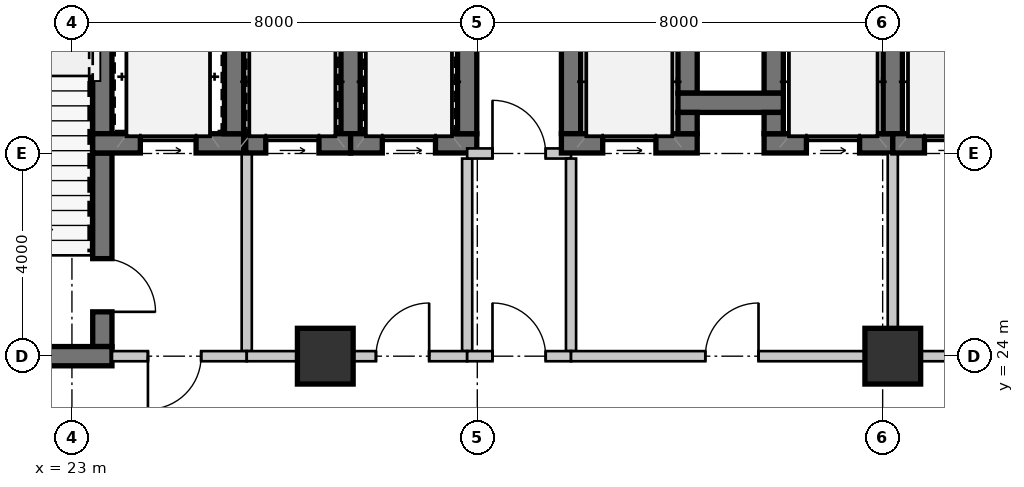
"""IFC4 building model, lengths in metres.
Left out: names, types, materials, properties, quantities, classifications, styles, units other than length and angle.
Written with IfcOpenShell. Run it as: python <this file> out.ifc"""

import sys

from ifc_helpers import new_model, si_unit, direction, frame, frame_2d, origin, origin_2d, place, context, subcontext, project, spatial, rectangle, extrude, source, transform, mapped, element, fill, save


model = new_model("IFC4")
c1 = context("Model", 3, precision=1e-05, world=origin(), true_north=direction((0.0, 1.0)))
c2 = subcontext(c1, "Body", "Model", "MODEL_VIEW")
j1 = project(units=[si_unit("LENGTHUNIT", "METRE"), si_unit("PLANEANGLEUNIT", "RADIAN")], contexts=[c1])
p1 = place(None, origin())
s1 = spatial("IfcSite", under=j1, at=p1, CompositionType="ELEMENT")
p2 = place(p1, origin())
s2 = spatial("IfcBuilding", under=s1, at=p2, CompositionType="ELEMENT")
p3 = place(p2, origin())
s3 = spatial("IfcBuildingStorey", under=s2, at=p3, CompositionType="ELEMENT", Elevation=0.0)
m1 = source(origin(), c2, "Body", "SweptSolid", [
    extrude(rectangle(XDim=1.1, YDim=1.1, at=origin_2d()), origin(), (0.0, 0.0, 1.0), 4.55),
])
for number, where, z_axis, x_axis in (
    (1, (28.0, 24.0, 0.0), (0.0, 0.0, 1.0), (1.0, 0.0, 0.0)),
    (2, (39.2, 24.0, 0.0), (0.0, 0.0, 1.0), (1.0, 0.0, 0.0)),
):
    element("IfcColumn", number, at=place(p3, frame(where, z_axis=z_axis, x_axis=x_axis)), inside=s3, PredefinedType="COLUMN", context=c2, shape_type="MappedRepresentation", body=[
        mapped(m1, transform((0.0, 0.0, 0.0), scale=1.0)),
    ])
m2 = source(origin(), c2, "Body", "SweptSolid", [
    extrude(rectangle(XDim=3.42, YDim=0.38, at=frame_2d((1.71, 0.0))), origin(), (0.0, 0.0, 1.0), 4.29),
])
p4 = place(p3, frame((23.6, 28.39, 0.0), z_axis=(0.0, 0.0, 1.0), x_axis=(0.0, 1.0, 0.0)))
e3 = element("IfcWall", 3, at=p4, inside=s3, PredefinedType="SHEAR", context=c2, shape_type="MappedRepresentation", body=[
    mapped(m2, transform((0.0, 0.0, 0.0), scale=1.0)),
])
m3 = source(origin(), c2, "Body", "SweptSolid", [
    extrude(rectangle(XDim=3.82, YDim=0.38, at=frame_2d((1.91, 0.0))), origin(), (0.0, 0.0, 1.0), 4.29),
])
p5 = place(p3, frame((23.6, 24.19, 0.0), z_axis=(0.0, 0.0, 1.0), x_axis=(0.0, 1.0, 0.0)))
e4 = element("IfcWall", 4, at=p5, inside=s3, PredefinedType="SHEAR", context=c2, shape_type="MappedRepresentation", body=[
    mapped(m3, transform((0.0, 0.0, 0.0), scale=1.0)),
])
m4 = source(origin(), c2, "Body", "SweptSolid", [
    extrude(rectangle(XDim=1.05, YDim=2.1, at=frame_2d((0.525, 1.05))), frame((0.0, 0.2, 0.0), z_axis=(0.0, -1.0, 0.0), x_axis=(1.0, 0.0, 0.0)), (0.0, 0.0, 1.0), 0.4),
])
p6 = place(p5, frame((0.685, 0.0, 0.0)))
e5 = element("IfcOpeningElement", 5, at=p6, cuts=e4, PredefinedType="OPENING", context=c2, shape_type="MappedRepresentation", body=[
    mapped(m4, transform((0.0, 0.0, 0.0), scale=1.0)),
])
m5 = source(origin(), c2, "Body", "SweptSolid", [
    extrude(rectangle(XDim=4.98, YDim=0.38, at=frame_2d((2.49, 0.0))), origin(), (0.0, 0.0, 1.0), 4.29),
])
p7 = place(p3, frame((18.81, 24.0, 0.0), z_axis=(0.0, 0.0, 1.0), x_axis=(1.0, 0.0, 0.0)))
e6 = element("IfcWall", 6, at=p7, inside=s3, PredefinedType="SHEAR", context=c2, shape_type="MappedRepresentation", body=[
    mapped(m5, transform((0.0, 0.0, 0.0), scale=1.0)),
])
m6 = source(origin(), c2, "Body", "SweptSolid", [
    extrude(rectangle(XDim=2.98, YDim=0.38, at=frame_2d((1.49, 0.0))), origin(), (0.0, 0.0, 1.0), 4.29),
])
p8 = place(p3, frame((23.41, 28.2, 0.0), z_axis=(0.0, 0.0, 1.0), x_axis=(1.0, 0.0, 0.0)))
e7 = element("IfcWall", 7, at=p8, inside=s3, PredefinedType="SHEAR", context=c2, shape_type="MappedRepresentation", body=[
    mapped(m6, transform((0.0, 0.0, 0.0), scale=1.0)),
])
m7 = source(origin(), c2, "Body", "SweptSolid", [
    extrude(rectangle(XDim=1.1, YDim=2.15, at=frame_2d((0.55, 1.075))), frame((0.0, 0.2, 0.0), z_axis=(0.0, -1.0, 0.0), x_axis=(1.0, 0.0, 0.0)), (0.0, 0.0, 1.0), 0.4),
])
p9 = place(p8, frame((0.94, 0.0, 0.0)))
e8 = element("IfcOpeningElement", 8, at=p9, cuts=e7, PredefinedType="OPENING", context=c2, shape_type="MappedRepresentation", body=[
    mapped(m7, transform((0.0, 0.0, 0.0), scale=1.0)),
])
p10 = place(p3, frame((26.2, 28.39, 0.0), z_axis=(0.0, 0.0, 1.0), x_axis=(0.0, 1.0, 0.0)))
e9 = element("IfcWall", 9, at=p10, inside=s3, PredefinedType="SHEAR", context=c2, shape_type="MappedRepresentation", body=[
    mapped(m2, transform((0.0, 0.0, 0.0), scale=1.0)),
])
m8 = source(origin(), c2, "Body", "SweptSolid", [
    extrude(rectangle(XDim=3.91, YDim=0.2, at=frame_2d((1.955, 0.0))), origin(), (0.0, 0.0, 1.0), 4.29),
])
p11 = place(p3, frame((26.45, 24.1, 0.0), z_axis=(0.0, 0.0, 1.0), x_axis=(0.0, 1.0, 0.0)))
e10 = element("IfcWall", 10, at=p11, inside=s3, PredefinedType="SOLIDWALL", context=c2, shape_type="MappedRepresentation", body=[
    mapped(m8, transform((0.0, 0.0, 0.0), scale=1.0)),
])
m9 = source(origin(), c2, "Body", "SweptSolid", [
    extrude(rectangle(XDim=2.66, YDim=0.2, at=frame_2d((1.33, 0.0))), origin(), (0.0, 0.0, 1.0), 3.83),
])
p12 = place(p3, frame((23.79, 24.0, 0.0), z_axis=(0.0, 0.0, 1.0), x_axis=(1.0, 0.0, 0.0)))
e11 = element("IfcWall", 11, at=p12, inside=s3, PredefinedType="SOLIDWALL", context=c2, shape_type="MappedRepresentation", body=[
    mapped(m9, transform((0.0, 0.0, 0.0), scale=1.0)),
])
m10 = source(origin(), c2, "Body", "SweptSolid", [
    extrude(rectangle(XDim=1.05, YDim=2.1, at=frame_2d((0.525, 1.05))), frame((0.0, 0.11, 0.0), z_axis=(0.0, -1.0, 0.0), x_axis=(1.0, 0.0, 0.0)), (0.0, 0.0, 1.0), 0.22),
])
p13 = place(p12, frame((0.71, 0.0, 0.0)))
e12 = element("IfcOpeningElement", 12, at=p13, cuts=e11, PredefinedType="OPENING", context=c2, shape_type="MappedRepresentation", body=[
    mapped(m10, transform((0.0, 0.0, 0.0), scale=1.0)),
])
m11 = source(origin(), c2, "Body", "SweptSolid", [
    extrude(rectangle(XDim=1.12, YDim=0.38, at=frame_2d((0.56, 0.0))), origin(), (0.0, 0.0, 1.0), 4.29),
])
for number, where, z_axis, x_axis in (
    (13, (35.15, 30.31, 0.0), (0.0, 0.0, 1.0), (0.0, -1.0, 0.0)),
    (14, (36.85, 29.19, 0.0), (0.0, 0.0, 1.0), (0.0, 1.0, 0.0)),
):
    element("IfcWall", number, at=place(p3, frame(where, z_axis=z_axis, x_axis=x_axis)), inside=s3, PredefinedType="SHEAR", context=c2, shape_type="MappedRepresentation", body=[
        mapped(m11, transform((0.0, 0.0, 0.0), scale=1.0)),
    ])
m12 = source(origin(), c2, "Body", "SweptSolid", [
    extrude(rectangle(XDim=2.08, YDim=0.38, at=frame_2d((1.04, 0.0))), origin(), (0.0, 0.0, 1.0), 4.29),
])
p14 = place(p3, frame((34.96, 29.0, 0.0), z_axis=(0.0, 0.0, 1.0), x_axis=(1.0, 0.0, 0.0)))
e15 = element("IfcWall", 15, at=p14, inside=s3, PredefinedType="SHEAR", context=c2, shape_type="MappedRepresentation", body=[
    mapped(m12, transform((0.0, 0.0, 0.0), scale=1.0)),
])
p15 = place(p3, frame((28.5, 28.39, 0.0), z_axis=(0.0, 0.0, 1.0), x_axis=(0.0, 1.0, 0.0)))
e16 = element("IfcWall", 16, at=p15, inside=s3, PredefinedType="SHEAR", context=c2, shape_type="MappedRepresentation", body=[
    mapped(m2, transform((0.0, 0.0, 0.0), scale=1.0)),
])
m13 = source(origin(), c2, "Body", "SweptSolid", [
    extrude(rectangle(XDim=2.07, YDim=0.38, at=frame_2d((1.035, 0.0))), origin(), (0.0, 0.0, 1.0), 4.29),
])
p16 = place(p3, frame((26.43, 28.2, 0.0), z_axis=(0.0, 0.0, 1.0), x_axis=(1.0, 0.0, 0.0)))
e17 = element("IfcWall", 17, at=p16, inside=s3, PredefinedType="SHEAR", context=c2, shape_type="MappedRepresentation", body=[
    mapped(m13, transform((0.0, 0.0, 0.0), scale=1.0)),
])
m14 = source(origin(), c2, "Body", "SweptSolid", [
    extrude(rectangle(XDim=1.05, YDim=2.15, at=frame_2d((0.525, 1.075))), frame((0.0, 0.2, 0.0), z_axis=(0.0, -1.0, 0.0), x_axis=(1.0, 0.0, 0.0)), (0.0, 0.0, 1.0), 0.4),
])
p17 = place(p16, frame((0.395, 0.0, 0.0)))
e18 = element("IfcOpeningElement", 18, at=p17, cuts=e17, PredefinedType="OPENING", context=c2, shape_type="MappedRepresentation", body=[
    mapped(m14, transform((0.0, 0.0, 0.0), scale=1.0)),
])
m15 = source(origin(), c2, "Body", "SweptSolid", [
    extrude(rectangle(XDim=2.49, YDim=0.38, at=frame_2d((1.245, 0.0))), origin(), (0.0, 0.0, 1.0), 4.29),
])
p18 = place(p3, frame((28.5, 28.2, 0.0), z_axis=(0.0, 0.0, 1.0), x_axis=(1.0, 0.0, 0.0)))
e19 = element("IfcWall", 19, at=p18, inside=s3, PredefinedType="SHEAR", context=c2, shape_type="MappedRepresentation", body=[
    mapped(m15, transform((0.0, 0.0, 0.0), scale=1.0)),
])
p19 = place(p18, frame((0.625, 0.0, 0.0)))
e20 = element("IfcOpeningElement", 20, at=p19, cuts=e19, PredefinedType="OPENING", context=c2, shape_type="MappedRepresentation", body=[
    mapped(m14, transform((0.0, 0.0, 0.0), scale=1.0)),
])
p20 = place(p3, frame((30.8, 28.39, 0.0), z_axis=(0.0, 0.0, 1.0), x_axis=(0.0, 1.0, 0.0)))
e21 = element("IfcWall", 21, at=p20, inside=s3, PredefinedType="SHEAR", context=c2, shape_type="MappedRepresentation", body=[
    mapped(m2, transform((0.0, 0.0, 0.0), scale=1.0)),
])
m16 = source(origin(), c2, "Body", "SweptSolid", [
    extrude(rectangle(XDim=3.8, YDim=0.2, at=frame_2d((1.9, 0.0))), origin(), (0.0, 0.0, 1.0), 4.29),
])
p21 = place(p3, frame((30.8, 27.9, 0.0), z_axis=(0.0, 0.0, 1.0), x_axis=(0.0, -1.0, 0.0)))
e22 = element("IfcWall", 22, at=p21, inside=s3, PredefinedType="SOLIDWALL", context=c2, shape_type="MappedRepresentation", body=[
    mapped(m16, transform((0.0, 0.0, 0.0), scale=1.0)),
])
m17 = source(origin(), c2, "Body", "SweptSolid", [
    extrude(rectangle(XDim=4.35, YDim=0.2, at=frame_2d((2.175, 0.0))), origin(), (0.0, 0.0, 1.0), 3.83),
])
p22 = place(p3, frame((30.8, 24.0, 0.0), z_axis=(0.0, 0.0, 1.0), x_axis=(-1.0, 0.0, 0.0)))
e23 = element("IfcWall", 23, at=p22, inside=s3, PredefinedType="SOLIDWALL", context=c2, shape_type="MappedRepresentation", body=[
    mapped(m17, transform((0.0, 0.0, 0.0), scale=1.0)),
])
p23 = place(p22, frame((0.75, 0.0, 0.0)))
e24 = element("IfcOpeningElement", 24, at=p23, cuts=e23, PredefinedType="OPENING", context=c2, shape_type="MappedRepresentation", body=[
    mapped(m10, transform((0.0, 0.0, 0.0), scale=1.0)),
])
m18 = source(origin(), c2, "Body", "SweptSolid", [
    extrude(rectangle(XDim=2.05, YDim=0.2, at=frame_2d((1.025, 0.0))), origin(), (0.0, 0.0, 1.0), 4.29),
])
p24 = place(p3, frame((30.8, 28.0, 0.0), z_axis=(0.0, 0.0, 1.0), x_axis=(1.0, 0.0, 0.0)))
e25 = element("IfcWall", 25, at=p24, inside=s3, PredefinedType="SOLIDWALL", context=c2, shape_type="MappedRepresentation", body=[
    mapped(m18, transform((0.0, 0.0, 0.0), scale=1.0)),
])
p25 = place(p24, frame((0.5, 0.0, 0.0)))
e26 = element("IfcOpeningElement", 26, at=p25, cuts=e25, PredefinedType="OPENING", context=c2, shape_type="MappedRepresentation", body=[
    mapped(m10, transform((0.0, 0.0, 0.0), scale=1.0)),
])
p26 = place(p3, frame((32.85, 27.9, 0.0), z_axis=(0.0, 0.0, 1.0), x_axis=(0.0, -1.0, 0.0)))
e27 = element("IfcWall", 27, at=p26, inside=s3, PredefinedType="SOLIDWALL", context=c2, shape_type="MappedRepresentation", body=[
    mapped(m16, transform((0.0, 0.0, 0.0), scale=1.0)),
])
m19 = source(origin(), c2, "Body", "SweptSolid", [
    extrude(rectangle(XDim=2.05, YDim=0.2, at=frame_2d((1.025, 0.0))), origin(), (0.0, 0.0, 1.0), 3.83),
])
p27 = place(p3, frame((32.85, 24.0, 0.0), z_axis=(0.0, 0.0, 1.0), x_axis=(-1.0, 0.0, 0.0)))
e28 = element("IfcWall", 28, at=p27, inside=s3, PredefinedType="SOLIDWALL", context=c2, shape_type="MappedRepresentation", body=[
    mapped(m19, transform((0.0, 0.0, 0.0), scale=1.0)),
])
p28 = place(p27, frame((0.5, 0.0, 0.0)))
e29 = element("IfcOpeningElement", 29, at=p28, cuts=e28, PredefinedType="OPENING", context=c2, shape_type="MappedRepresentation", body=[
    mapped(m10, transform((0.0, 0.0, 0.0), scale=1.0)),
])
p29 = place(p3, frame((32.85, 31.81, 0.0), z_axis=(0.0, 0.0, 1.0), x_axis=(0.0, -1.0, 0.0)))
e30 = element("IfcWall", 30, at=p29, inside=s3, PredefinedType="SHEAR", context=c2, shape_type="MappedRepresentation", body=[
    mapped(m2, transform((0.0, 0.0, 0.0), scale=1.0)),
])
m20 = source(origin(), c2, "Body", "SweptSolid", [
    extrude(rectangle(XDim=2.68, YDim=0.38, at=frame_2d((1.34, 0.0))), origin(), (0.0, 0.0, 1.0), 4.29),
])
p30 = place(p3, frame((32.66, 28.2, 0.0), z_axis=(0.0, 0.0, 1.0), x_axis=(1.0, 0.0, 0.0)))
e31 = element("IfcWall", 31, at=p30, inside=s3, PredefinedType="SHEAR", context=c2, shape_type="MappedRepresentation", body=[
    mapped(m20, transform((0.0, 0.0, 0.0), scale=1.0)),
])
p31 = place(p30, frame((0.815, 0.0, 0.0)))
e32 = element("IfcOpeningElement", 32, at=p31, cuts=e31, PredefinedType="OPENING", context=c2, shape_type="MappedRepresentation", body=[
    mapped(m14, transform((0.0, 0.0, 0.0), scale=1.0)),
])
m21 = source(origin(), c2, "Body", "SweptSolid", [
    extrude(rectangle(XDim=0.42, YDim=0.38, at=frame_2d((0.21, 0.0))), origin(), (0.0, 0.0, 1.0), 4.29),
])
p32 = place(p3, frame((35.15, 28.39, 0.0), z_axis=(0.0, 0.0, 1.0), x_axis=(0.0, 1.0, 0.0)))
e33 = element("IfcWall", 33, at=p32, inside=s3, PredefinedType="SHEAR", context=c2, shape_type="MappedRepresentation", body=[
    mapped(m21, transform((0.0, 0.0, 0.0), scale=1.0)),
])
m22 = source(origin(), c2, "Body", "SweptSolid", [
    extrude(rectangle(XDim=2.54, YDim=0.38, at=frame_2d((1.27, 0.0))), origin(), (0.0, 0.0, 1.0), 4.29),
])
p33 = place(p3, frame((36.66, 28.2, 0.0), z_axis=(0.0, 0.0, 1.0), x_axis=(1.0, 0.0, 0.0)))
e34 = element("IfcWall", 34, at=p33, inside=s3, PredefinedType="SHEAR", context=c2, shape_type="MappedRepresentation", body=[
    mapped(m22, transform((0.0, 0.0, 0.0), scale=1.0)),
])
p34 = place(p33, frame((0.835, 0.0, 0.0)))
e35 = element("IfcOpeningElement", 35, at=p34, cuts=e34, PredefinedType="OPENING", context=c2, shape_type="MappedRepresentation", body=[
    mapped(m14, transform((0.0, 0.0, 0.0), scale=1.0)),
])
p35 = place(p3, frame((36.85, 28.81, 0.0), z_axis=(0.0, 0.0, 1.0), x_axis=(0.0, -1.0, 0.0)))
e36 = element("IfcWall", 36, at=p35, inside=s3, PredefinedType="SHEAR", context=c2, shape_type="MappedRepresentation", body=[
    mapped(m21, transform((0.0, 0.0, 0.0), scale=1.0)),
])
p36 = place(p3, frame((39.2, 28.39, 0.0), z_axis=(0.0, 0.0, 1.0), x_axis=(0.0, 1.0, 0.0)))
e37 = element("IfcWall", 37, at=p36, inside=s3, PredefinedType="SHEAR", context=c2, shape_type="MappedRepresentation", body=[
    mapped(m2, transform((0.0, 0.0, 0.0), scale=1.0)),
])
m23 = source(origin(), c2, "Body", "SweptSolid", [
    extrude(rectangle(XDim=3.91, YDim=0.2, at=frame_2d((1.955, 0.0))), origin(), (0.0, 0.0, 1.0), 3.83),
])
p37 = place(p3, frame((39.2, 28.01, 0.0), z_axis=(0.0, 0.0, 1.0), x_axis=(0.0, -1.0, 0.0)))
e38 = element("IfcWall", 38, at=p37, inside=s3, PredefinedType="SOLIDWALL", context=c2, shape_type="MappedRepresentation", body=[
    mapped(m23, transform((0.0, 0.0, 0.0), scale=1.0)),
])
m24 = source(origin(), c2, "Body", "SweptSolid", [
    extrude(rectangle(XDim=6.35, YDim=0.2, at=frame_2d((3.175, 0.0))), origin(), (0.0, 0.0, 1.0), 3.83),
])
p38 = place(p3, frame((39.2, 24.0, 0.0), z_axis=(0.0, 0.0, 1.0), x_axis=(-1.0, 0.0, 0.0)))
e39 = element("IfcWall", 39, at=p38, inside=s3, PredefinedType="SOLIDWALL", context=c2, shape_type="MappedRepresentation", body=[
    mapped(m24, transform((0.0, 0.0, 0.0), scale=1.0)),
])
p39 = place(p38, frame((2.65, 0.0, 0.0)))
e40 = element("IfcOpeningElement", 40, at=p39, cuts=e39, PredefinedType="OPENING", context=c2, shape_type="MappedRepresentation", body=[
    mapped(m10, transform((0.0, 0.0, 0.0), scale=1.0)),
])
m25 = source(origin(), c2, "Body", "SweptSolid", [
    extrude(rectangle(XDim=2.3, YDim=0.38, at=frame_2d((1.15, 0.0))), origin(), (0.0, 0.0, 1.0), 4.29),
])
p40 = place(p3, frame((39.2, 28.2, 0.0), z_axis=(0.0, 0.0, 1.0), x_axis=(1.0, 0.0, 0.0)))
e41 = element("IfcWall", 41, at=p40, inside=s3, PredefinedType="SHEAR", context=c2, shape_type="MappedRepresentation", body=[
    mapped(m25, transform((0.0, 0.0, 0.0), scale=1.0)),
])
p41 = place(p40, frame((0.625, 0.0, 0.0)))
e42 = element("IfcOpeningElement", 42, at=p41, cuts=e41, PredefinedType="OPENING", context=c2, shape_type="MappedRepresentation", body=[
    mapped(m14, transform((0.0, 0.0, 0.0), scale=1.0)),
])
m26 = source(origin(), c2, "Body", "SweptSolid", [
    extrude(rectangle(XDim=4.35, YDim=0.2, at=frame_2d((2.175, 0.0))), origin(), (0.0, 0.0, 1.0), 3.757),
])
p42 = place(p3, frame((43.55, 24.0, 0.0), z_axis=(0.0, 0.0, 1.0), x_axis=(-1.0, 0.0, 0.0)))
e43 = element("IfcWall", 43, at=p42, inside=s3, PredefinedType="SOLIDWALL", context=c2, shape_type="MappedRepresentation", body=[
    mapped(m26, transform((0.0, 0.0, 0.0), scale=1.0)),
])
p43 = place(p42, frame((1.65, 0.0, 0.0)))
e44 = element("IfcOpeningElement", 44, at=p43, cuts=e43, PredefinedType="OPENING", context=c2, shape_type="MappedRepresentation", body=[
    mapped(m10, transform((0.0, 0.0, 0.0), scale=1.0)),
])
m27 = source(origin(), c2, "Body", "SweptSolid", [
    extrude(rectangle(XDim=1.05, YDim=2.1, at=frame_2d((0.525, 1.05))), frame((0.0, 0.025, 0.0), z_axis=(0.0, -1.0, 0.0), x_axis=(1.0, 0.0, 0.0)), (0.0, 0.0, 1.0), 0.05),
])
p44 = place(p6, frame((1.05, 0.0, 0.0), z_axis=(0.0, 0.0, 1.0), x_axis=(-1.0, 0.0, 0.0)))
e45 = element("IfcDoor", 45, at=p44, inside=s3, OperationType="SINGLE_SWING_RIGHT", PredefinedType="DOOR", context=c2, shape_type="MappedRepresentation", body=[
    mapped(m27, transform((0.0, 0.0, 0.0), scale=1.0)),
])
fill(e5, e45)
m28 = source(origin(), c2, "Body", "SweptSolid", [
    extrude(rectangle(XDim=1.1, YDim=2.15, at=frame_2d((0.55, 1.075))), frame((0.0, 0.025, 0.0), z_axis=(0.0, -1.0, 0.0), x_axis=(1.0, 0.0, 0.0)), (0.0, 0.0, 1.0), 0.05),
])
p45 = place(p9, origin())
e46 = element("IfcDoor", 46, at=p45, inside=s3, OperationType="SLIDING_TO_LEFT", PredefinedType="DOOR", context=c2, shape_type="MappedRepresentation", body=[
    mapped(m28, transform((0.0, 0.0, 0.0), scale=1.0)),
])
fill(e8, e46)
p46 = place(p13, frame((1.05, 0.0, 0.0), z_axis=(0.0, 0.0, 1.0), x_axis=(-1.0, 0.0, 0.0)))
e47 = element("IfcDoor", 47, at=p46, inside=s3, OperationType="SINGLE_SWING_RIGHT", PredefinedType="DOOR", context=c2, shape_type="MappedRepresentation", body=[
    mapped(m27, transform((0.0, 0.0, 0.0), scale=1.0)),
])
fill(e12, e47)
m29 = source(origin(), c2, "Body", "SweptSolid", [
    extrude(rectangle(XDim=1.05, YDim=2.15, at=frame_2d((0.525, 1.075))), frame((0.0, 0.025, 0.0), z_axis=(0.0, -1.0, 0.0), x_axis=(1.0, 0.0, 0.0)), (0.0, 0.0, 1.0), 0.05),
])
p47 = place(p17, origin())
e48 = element("IfcDoor", 48, at=p47, inside=s3, OperationType="SLIDING_TO_LEFT", PredefinedType="DOOR", context=c2, shape_type="MappedRepresentation", body=[
    mapped(m29, transform((0.0, 0.0, 0.0), scale=1.0)),
])
fill(e18, e48)
p48 = place(p19, origin())
e49 = element("IfcDoor", 49, at=p48, inside=s3, OperationType="SLIDING_TO_LEFT", PredefinedType="DOOR", context=c2, shape_type="MappedRepresentation", body=[
    mapped(m29, transform((0.0, 0.0, 0.0), scale=1.0)),
])
fill(e20, e49)
p49 = place(p23, frame((1.05, 0.0, 0.0), z_axis=(0.0, 0.0, 1.0), x_axis=(-1.0, 0.0, 0.0)))
e50 = element("IfcDoor", 50, at=p49, inside=s3, OperationType="SINGLE_SWING_RIGHT", PredefinedType="DOOR", context=c2, shape_type="MappedRepresentation", body=[
    mapped(m27, transform((0.0, 0.0, 0.0), scale=1.0)),
])
fill(e24, e50)
p50 = place(p25, origin())
e51 = element("IfcDoor", 51, at=p50, inside=s3, OperationType="SINGLE_SWING_LEFT", PredefinedType="DOOR", context=c2, shape_type="MappedRepresentation", body=[
    mapped(m27, transform((0.0, 0.0, 0.0), scale=1.0)),
])
fill(e26, e51)
p51 = place(p28, frame((1.05, 0.0, 0.0), z_axis=(0.0, 0.0, 1.0), x_axis=(-1.0, 0.0, 0.0)))
e52 = element("IfcDoor", 52, at=p51, inside=s3, OperationType="SINGLE_SWING_LEFT", PredefinedType="DOOR", context=c2, shape_type="MappedRepresentation", body=[
    mapped(m27, transform((0.0, 0.0, 0.0), scale=1.0)),
])
fill(e29, e52)
p52 = place(p31, origin())
e53 = element("IfcDoor", 53, at=p52, inside=s3, OperationType="SLIDING_TO_LEFT", PredefinedType="DOOR", context=c2, shape_type="MappedRepresentation", body=[
    mapped(m29, transform((0.0, 0.0, 0.0), scale=1.0)),
])
fill(e32, e53)
p53 = place(p34, origin())
e54 = element("IfcDoor", 54, at=p53, inside=s3, OperationType="SLIDING_TO_LEFT", PredefinedType="DOOR", context=c2, shape_type="MappedRepresentation", body=[
    mapped(m29, transform((0.0, 0.0, 0.0), scale=1.0)),
])
fill(e35, e54)
p54 = place(p39, frame((1.05, 0.0, 0.0), z_axis=(0.0, 0.0, 1.0), x_axis=(-1.0, 0.0, 0.0)))
e55 = element("IfcDoor", 55, at=p54, inside=s3, OperationType="SINGLE_SWING_RIGHT", PredefinedType="DOOR", context=c2, shape_type="MappedRepresentation", body=[
    mapped(m27, transform((0.0, 0.0, 0.0), scale=1.0)),
])
fill(e40, e55)
p55 = place(p41, origin())
e56 = element("IfcDoor", 56, at=p55, inside=s3, OperationType="SLIDING_TO_LEFT", PredefinedType="DOOR", context=c2, shape_type="MappedRepresentation", body=[
    mapped(m29, transform((0.0, 0.0, 0.0), scale=1.0)),
])
fill(e42, e56)
save(model, sys.argv[1])
